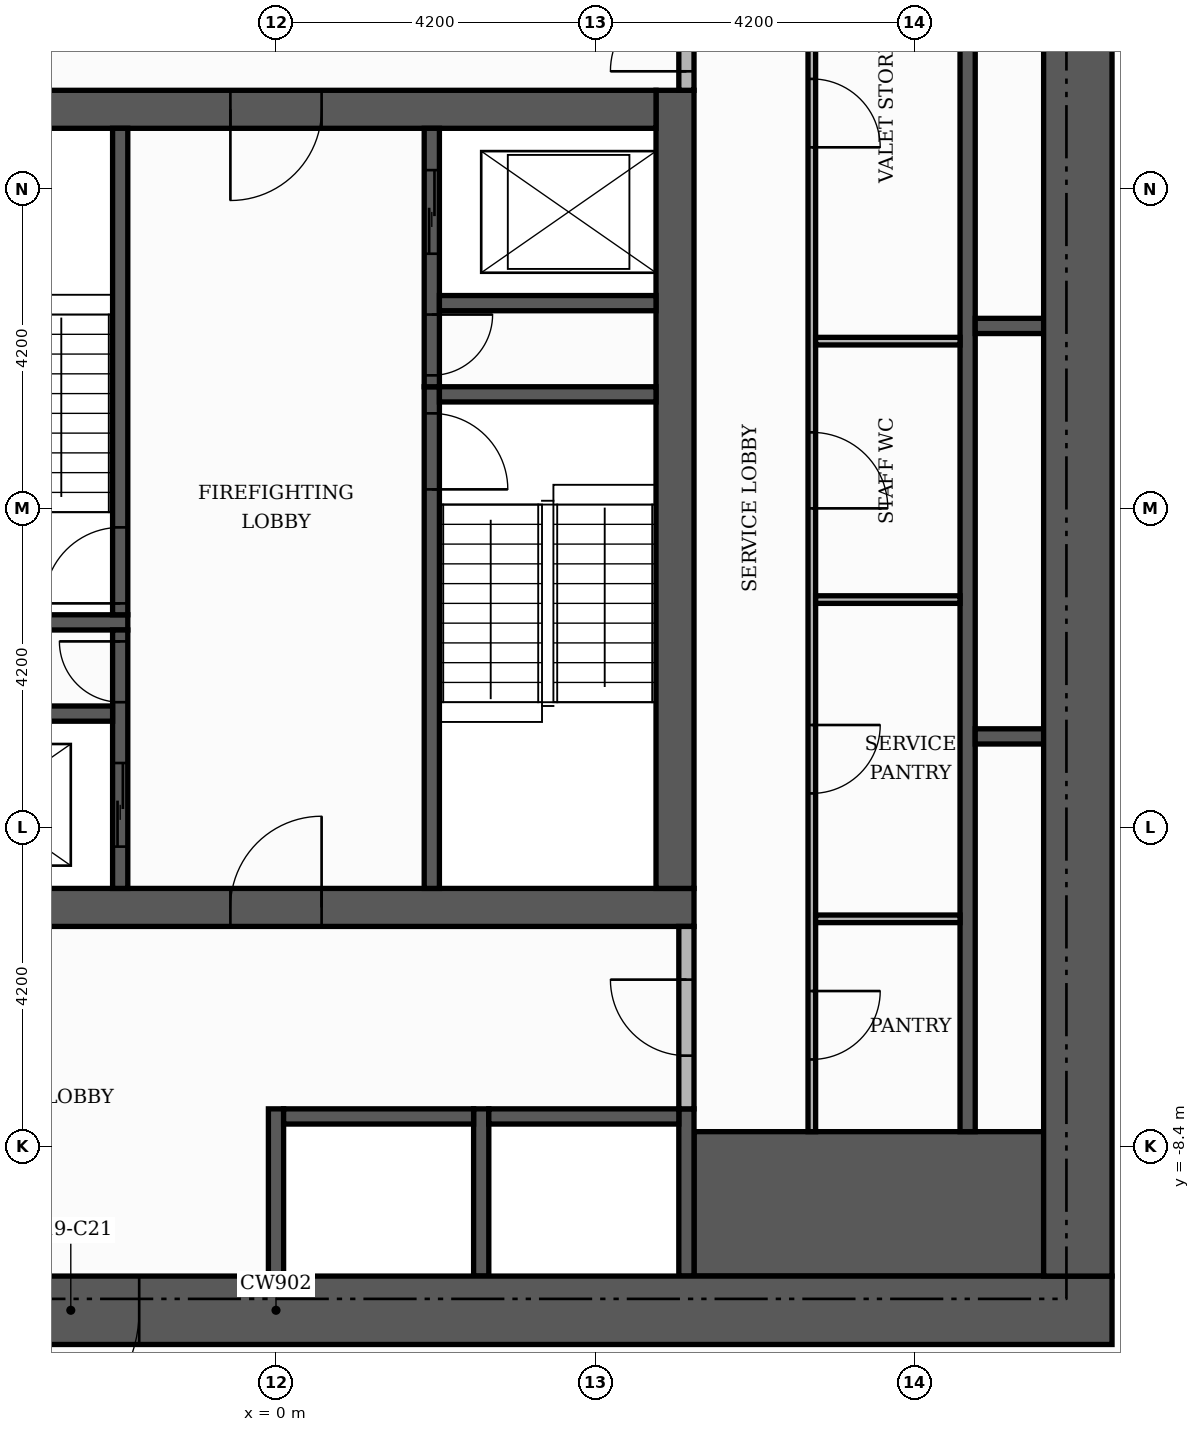
"""IFC4 building model, lengths in metres.
Left out: names, types, materials, properties, quantities, classifications, styles, units other than length and angle.
Written with IfcOpenShell. Run it as: python <this file> out.ifc"""

import sys

from ifc_helpers import new_model, si_unit, direction, frame, frame_2d, origin, place, context, subcontext, project, spatial, rectangle, extrude, element, fill, save


model = new_model("IFC4")
c1 = context("Model", 3, precision=1e-05, world=origin(), true_north=direction((0.0, 1.0)))
c2 = subcontext(c1, "Body", "Model", "MODEL_VIEW")
j1 = project(units=[si_unit("LENGTHUNIT", "METRE"), si_unit("PLANEANGLEUNIT", "RADIAN")], contexts=[c1])
p1 = place(None, origin())
s1 = spatial("IfcSite", under=j1, at=p1, CompositionType="ELEMENT")
p2 = place(p1, origin())
s2 = spatial("IfcBuilding", under=s1, at=p2, CompositionType="ELEMENT")
p3 = place(p2, frame((0.0, 0.0, 83.1)))
s3 = spatial("IfcBuildingStorey", under=s2, at=p3, CompositionType="ELEMENT", Elevation=83.1)
p4 = place(p3, frame((-5.5, -5.25, 0.0), z_axis=(0.0, 0.0, 1.0), x_axis=(1.0, 0.0, 0.0)))
e1 = element("IfcWall", 1, at=p4, inside=s3, PredefinedType="SHEAR", context=c2, shape_type="SweptSolid", body=[
    extrude(rectangle(XDim=11.0, YDim=0.5, at=frame_2d((5.5, 0.0))), origin(), (0.0, 0.0, 1.0), 3.48),
])
p5 = place(p4, frame((4.9, 0.0, 0.0)))
e2 = element("IfcOpeningElement", 2, at=p5, cuts=e1, PredefinedType="OPENING", context=c2, shape_type="SweptSolid", body=[
    extrude(rectangle(XDim=1.2, YDim=2.1, at=frame_2d((0.6, 1.05))), frame((0.0, 0.26, 0.0), z_axis=(0.0, -1.0, 0.0), x_axis=(1.0, 0.0, 0.0)), (0.0, 0.0, 1.0), 0.52),
])
p6 = place(p3, frame((5.25, -5.0, 0.0), z_axis=(0.0, 0.0, 1.0), x_axis=(0.0, 1.0, 0.0)))
e3 = element("IfcWall", 3, at=p6, inside=s3, PredefinedType="SHEAR", context=c2, shape_type="SweptSolid", body=[
    extrude(rectangle(XDim=10.5, YDim=0.5, at=frame_2d((5.25, 0.0))), origin(), (0.0, 0.0, 1.0), 3.48),
])
p7 = place(p3, frame((-5.0, 5.25, 0.0), z_axis=(0.0, 0.0, 1.0), x_axis=(1.0, 0.0, 0.0)))
e4 = element("IfcWall", 4, at=p7, inside=s3, PredefinedType="SHEAR", context=c2, shape_type="SweptSolid", body=[
    extrude(rectangle(XDim=10.0, YDim=0.5, at=frame_2d((5.0, 0.0))), origin(), (0.0, 0.0, 1.0), 3.48),
])
p8 = place(p7, frame((4.4, 0.0, 0.0)))
e5 = element("IfcOpeningElement", 5, at=p8, cuts=e4, PredefinedType="OPENING", context=c2, shape_type="SweptSolid", body=[
    extrude(rectangle(XDim=1.2, YDim=2.1, at=frame_2d((0.6, 1.05))), frame((0.0, 0.26, 0.0), z_axis=(0.0, -1.0, 0.0), x_axis=(1.0, 0.0, 0.0)), (0.0, 0.0, 1.0), 0.52),
])
p9 = place(p3, frame((5.5, -9.15, 0.0), z_axis=(0.0, 0.0, 1.0), x_axis=(1.0, 0.0, 0.0)))
e6 = element("IfcWall", 6, at=p9, inside=s3, PredefinedType="SHEAR", context=c2, shape_type="SweptSolid", body=[
    extrude(rectangle(XDim=4.6, YDim=1.9, at=frame_2d((2.3, 0.0))), origin(), (0.0, 0.0, 1.0), 3.48),
])
p10 = place(p3, frame((2.05, -5.0, 0.0), z_axis=(0.0, 0.0, 1.0), x_axis=(0.0, 1.0, 0.0)))
e7 = element("IfcWall", 7, at=p10, inside=s3, PredefinedType="SHEAR", context=c2, shape_type="SweptSolid", body=[
    extrude(rectangle(XDim=6.6, YDim=0.2, at=frame_2d((3.3, 0.0))), origin(), (0.0, 0.0, 1.0), 3.48),
])
p11 = place(p10, frame((5.25, 0.0, 0.0)))
e8 = element("IfcOpeningElement", 8, at=p11, cuts=e7, PredefinedType="OPENING", context=c2, shape_type="SweptSolid", body=[
    extrude(rectangle(XDim=1.0, YDim=2.1, at=frame_2d((0.5, 1.05))), frame((0.0, 0.11, 0.0), z_axis=(0.0, -1.0, 0.0), x_axis=(1.0, 0.0, 0.0)), (0.0, 0.0, 1.0), 0.22),
])
p12 = place(p3, frame((-5.0, -1.5, 0.0), z_axis=(0.0, 0.0, 1.0), x_axis=(1.0, 0.0, 0.0)))
e9 = element("IfcWall", 9, at=p12, inside=s3, PredefinedType="SHEAR", context=c2, shape_type="SweptSolid", body=[
    extrude(rectangle(XDim=3.05, YDim=0.2, at=frame_2d((1.525, 0.0))), origin(), (0.0, 0.0, 1.0), 3.48),
])
p13 = place(p3, frame((-2.05, -1.4, 0.0), z_axis=(0.0, 0.0, 1.0), x_axis=(0.0, 1.0, 0.0)))
e10 = element("IfcWall", 10, at=p13, inside=s3, PredefinedType="SHEAR", context=c2, shape_type="SweptSolid", body=[
    extrude(rectangle(XDim=6.4, YDim=0.2, at=frame_2d((3.2, 0.0))), origin(), (0.0, 0.0, 1.0), 3.48),
])
p14 = place(p13, frame((0.15, 0.0, 0.0)))
e11 = element("IfcOpeningElement", 11, at=p14, cuts=e10, PredefinedType="OPENING", context=c2, shape_type="SweptSolid", body=[
    extrude(rectangle(XDim=1.0, YDim=2.1, at=frame_2d((0.5, 1.05))), frame((0.0, 0.11, 0.0), z_axis=(0.0, -1.0, 0.0), x_axis=(1.0, 0.0, 0.0)), (0.0, 0.0, 1.0), 0.22),
])
p15 = place(p3, frame((2.15, 1.5, 0.0), z_axis=(0.0, 0.0, 1.0), x_axis=(1.0, 0.0, 0.0)))
e12 = element("IfcWall", 12, at=p15, inside=s3, PredefinedType="SHEAR", context=c2, shape_type="SweptSolid", body=[
    extrude(rectangle(XDim=2.85, YDim=0.2, at=frame_2d((1.425, 0.0))), origin(), (0.0, 0.0, 1.0), 3.48),
])
for number, where, z_axis, x_axis in (
    (13, (0.0, -10.1, 0.0), (0.0, 0.0, 1.0), (0.0, 1.0, 0.0)),
    (14, (2.7, -10.1, 0.0), (0.0, 0.0, 1.0), (0.0, 1.0, 0.0)),
    (15, (5.4, -10.1, 0.0), (0.0, 0.0, 1.0), (0.0, 1.0, 0.0)),
):
    element("IfcWall", number, at=place(p3, frame(where, z_axis=z_axis, x_axis=x_axis)), inside=s3, PredefinedType="SHEAR", context=c2, shape_type="SweptSolid", body=[
        extrude(rectangle(XDim=2.2, YDim=0.2, at=frame_2d((1.1, 0.0))), origin(), (0.0, 0.0, 1.0), 3.48),
    ])
p16 = place(p3, frame((9.1, -8.2, 0.0), z_axis=(0.0, 0.0, 1.0), x_axis=(0.0, 1.0, 0.0)))
e16 = element("IfcWall", 16, at=p16, inside=s3, PredefinedType="SHEAR", context=c2, shape_type="SweptSolid", body=[
    extrude(rectangle(XDim=16.4, YDim=0.2, at=frame_2d((8.2, 0.0))), origin(), (0.0, 0.0, 1.0), 3.48),
])
for number, where, z_axis, x_axis in (
    (17, (0.1, -8.0, 0.0), (0.0, 0.0, 1.0), (1.0, 0.0, 0.0)),
    (18, (2.8, -8.0, 0.0), (0.0, 0.0, 1.0), (1.0, 0.0, 0.0)),
):
    element("IfcWall", number, at=place(p3, frame(where, z_axis=z_axis, x_axis=x_axis)), inside=s3, PredefinedType="SHEAR", context=c2, shape_type="SweptSolid", body=[
        extrude(rectangle(XDim=2.5, YDim=0.2, at=frame_2d((1.25, 0.0))), origin(), (0.0, 0.0, 1.0), 3.48),
    ])
p17 = place(p3, frame((-2.05, -5.0, 0.0), z_axis=(0.0, 0.0, 1.0), x_axis=(0.0, 1.0, 0.0)))
e19 = element("IfcWall", 19, at=p17, inside=s3, PredefinedType="SHEAR", context=c2, shape_type="SweptSolid", body=[
    extrude(rectangle(XDim=3.4, YDim=0.2, at=frame_2d((1.7, 0.0))), origin(), (0.0, 0.0, 1.0), 3.48),
])
p18 = place(p17, frame((0.55, 0.0, 0.0)))
e20 = element("IfcOpeningElement", 20, at=p18, cuts=e19, PredefinedType="OPENING", context=c2, shape_type="SweptSolid", body=[
    extrude(rectangle(XDim=1.1, YDim=2.1, at=frame_2d((0.55, 1.05))), frame((0.0, 0.11, 0.0), z_axis=(0.0, -1.0, 0.0), x_axis=(1.0, 0.0, 0.0)), (0.0, 0.0, 1.0), 0.22),
])
p19 = place(p17, frame((2.45, 0.0, 0.0)))
e21 = element("IfcOpeningElement", 21, at=p19, cuts=e19, PredefinedType="OPENING", context=c2, shape_type="SweptSolid", body=[
    extrude(rectangle(XDim=0.8, YDim=2.1, at=frame_2d((0.4, 1.05))), frame((0.0, 0.11, 0.0), z_axis=(0.0, -1.0, 0.0), x_axis=(1.0, 0.0, 0.0)), (0.0, 0.0, 1.0), 0.22),
])
p20 = place(p3, frame((9.2, -3.0, 0.0), z_axis=(0.0, 0.0, 1.0), x_axis=(1.0, 0.0, 0.0)))
e22 = element("IfcWall", 22, at=p20, inside=s3, PredefinedType="SHEAR", context=c2, shape_type="SweptSolid", body=[
    extrude(rectangle(XDim=0.9, YDim=0.2, at=frame_2d((0.45, 0.0))), origin(), (0.0, 0.0, 1.0), 3.48),
])
p21 = place(p3, frame((-5.0, -2.7, 0.0), z_axis=(0.0, 0.0, 1.0), x_axis=(1.0, 0.0, 0.0)))
e23 = element("IfcWall", 23, at=p21, inside=s3, PredefinedType="SHEAR", context=c2, shape_type="SweptSolid", body=[
    extrude(rectangle(XDim=2.85, YDim=0.2, at=frame_2d((1.425, 0.0))), origin(), (0.0, 0.0, 1.0), 3.48),
])
p22 = place(p3, frame((2.05, 1.6, 0.0), z_axis=(0.0, 0.0, 1.0), x_axis=(0.0, 1.0, 0.0)))
e24 = element("IfcWall", 24, at=p22, inside=s3, PredefinedType="SHEAR", context=c2, shape_type="SweptSolid", body=[
    extrude(rectangle(XDim=3.4, YDim=0.2, at=frame_2d((1.7, 0.0))), origin(), (0.0, 0.0, 1.0), 3.48),
])
p23 = place(p22, frame((1.75, 0.0, 0.0)))
e25 = element("IfcOpeningElement", 25, at=p23, cuts=e24, PredefinedType="OPENING", context=c2, shape_type="SweptSolid", body=[
    extrude(rectangle(XDim=1.1, YDim=2.1, at=frame_2d((0.55, 1.05))), frame((0.0, 0.11, 0.0), z_axis=(0.0, -1.0, 0.0), x_axis=(1.0, 0.0, 0.0)), (0.0, 0.0, 1.0), 0.22),
])
p24 = place(p22, frame((0.15, 0.0, 0.0)))
e26 = element("IfcOpeningElement", 26, at=p24, cuts=e24, PredefinedType="OPENING", context=c2, shape_type="SweptSolid", body=[
    extrude(rectangle(XDim=0.8, YDim=2.1, at=frame_2d((0.4, 1.05))), frame((0.0, 0.11, 0.0), z_axis=(0.0, -1.0, 0.0), x_axis=(1.0, 0.0, 0.0)), (0.0, 0.0, 1.0), 0.22),
])
p25 = place(p3, frame((9.2, 2.4, 0.0), z_axis=(0.0, 0.0, 1.0), x_axis=(1.0, 0.0, 0.0)))
e27 = element("IfcWall", 27, at=p25, inside=s3, PredefinedType="SHEAR", context=c2, shape_type="SweptSolid", body=[
    extrude(rectangle(XDim=0.9, YDim=0.2, at=frame_2d((0.45, 0.0))), origin(), (0.0, 0.0, 1.0), 3.48),
])
p26 = place(p3, frame((2.15, 2.7, 0.0), z_axis=(0.0, 0.0, 1.0), x_axis=(1.0, 0.0, 0.0)))
e28 = element("IfcWall", 28, at=p26, inside=s3, PredefinedType="SHEAR", context=c2, shape_type="SweptSolid", body=[
    extrude(rectangle(XDim=2.85, YDim=0.2, at=frame_2d((1.425, 0.0))), origin(), (0.0, 0.0, 1.0), 3.48),
])
p27 = place(p3, frame((-11.0, -10.55, 0.0), z_axis=(0.0, 0.0, 1.0), x_axis=(1.0, 0.0, 0.0)))
e29 = element("IfcWall", 29, at=p27, inside=s3, PredefinedType="SHEAR", context=c2, shape_type="SweptSolid", body=[
    extrude(rectangle(XDim=22.0, YDim=0.9, at=frame_2d((11.0, 0.0))), origin(), (0.0, 0.0, 1.0), 3.48),
])
p28 = place(p27, frame((7.4, 0.0, 0.0)))
e30 = element("IfcOpeningElement", 30, at=p28, cuts=e29, PredefinedType="OPENING", context=c2, shape_type="SweptSolid", body=[
    extrude(rectangle(XDim=1.8, YDim=2.2, at=frame_2d((0.9, 1.1))), frame((0.0, 0.46, 0.0), z_axis=(0.0, -1.0, 0.0), x_axis=(1.0, 0.0, 0.0)), (0.0, 0.0, 1.0), 0.92),
])
p29 = place(p3, frame((10.55, -10.1, 0.0), z_axis=(0.0, 0.0, 1.0), x_axis=(0.0, 1.0, 0.0)))
e31 = element("IfcWall", 31, at=p29, inside=s3, PredefinedType="SHEAR", context=c2, shape_type="SweptSolid", body=[
    extrude(rectangle(XDim=20.2, YDim=0.9, at=frame_2d((10.1, 0.0))), origin(), (0.0, 0.0, 1.0), 3.48),
])
p30 = place(p3, frame((7.05, -8.2, 0.0), z_axis=(0.0, 0.0, 1.0), x_axis=(0.0, 1.0, 0.0)))
e32 = element("IfcWall", 32, at=p30, inside=s3, PredefinedType="PARTITIONING", context=c2, shape_type="SweptSolid", body=[
    extrude(rectangle(XDim=16.4, YDim=0.1, at=frame_2d((8.2, 0.0))), origin(), (0.0, 0.0, 1.0), 3.48),
])
p31 = place(p30, frame((0.95, 0.0, 0.0)))
e33 = element("IfcOpeningElement", 33, at=p31, cuts=e32, PredefinedType="OPENING", context=c2, shape_type="SweptSolid", body=[
    extrude(rectangle(XDim=0.9, YDim=2.1, at=frame_2d((0.45, 1.05))), frame((0.0, 0.06, 0.0), z_axis=(0.0, -1.0, 0.0), x_axis=(1.0, 0.0, 0.0)), (0.0, 0.0, 1.0), 0.12),
])
p32 = place(p30, frame((4.45, 0.0, 0.0)))
e34 = element("IfcOpeningElement", 34, at=p32, cuts=e32, PredefinedType="OPENING", context=c2, shape_type="SweptSolid", body=[
    extrude(rectangle(XDim=0.9, YDim=2.1, at=frame_2d((0.45, 1.05))), frame((0.0, 0.06, 0.0), z_axis=(0.0, -1.0, 0.0), x_axis=(1.0, 0.0, 0.0)), (0.0, 0.0, 1.0), 0.12),
])
p33 = place(p30, frame((8.2, 0.0, 0.0)))
e35 = element("IfcOpeningElement", 35, at=p33, cuts=e32, PredefinedType="OPENING", context=c2, shape_type="SweptSolid", body=[
    extrude(rectangle(XDim=1.0, YDim=2.1, at=frame_2d((0.5, 1.05))), frame((0.0, 0.06, 0.0), z_axis=(0.0, -1.0, 0.0), x_axis=(1.0, 0.0, 0.0)), (0.0, 0.0, 1.0), 0.12),
])
p34 = place(p30, frame((12.95, 0.0, 0.0)))
e36 = element("IfcOpeningElement", 36, at=p34, cuts=e32, PredefinedType="OPENING", context=c2, shape_type="SweptSolid", body=[
    extrude(rectangle(XDim=0.9, YDim=2.1, at=frame_2d((0.45, 1.05))), frame((0.0, 0.06, 0.0), z_axis=(0.0, -1.0, 0.0), x_axis=(1.0, 0.0, 0.0)), (0.0, 0.0, 1.0), 0.12),
])
p35 = place(p3, frame((5.4, -7.9, 0.0), z_axis=(0.0, 0.0, 1.0), x_axis=(0.0, 1.0, 0.0)))
e37 = element("IfcWall", 37, at=p35, inside=s3, PredefinedType="PARTITIONING", context=c2, shape_type="SweptSolid", body=[
    extrude(rectangle(XDim=2.4, YDim=0.2, at=frame_2d((1.2, 0.0))), origin(), (0.0, 0.0, 1.0), 3.48),
])
p36 = place(p35, frame((0.7, 0.0, 0.0)))
e38 = element("IfcOpeningElement", 38, at=p36, cuts=e37, PredefinedType="OPENING", context=c2, shape_type="SweptSolid", body=[
    extrude(rectangle(XDim=1.0, YDim=2.1, at=frame_2d((0.5, 1.05))), frame((0.0, 0.11, 0.0), z_axis=(0.0, -1.0, 0.0), x_axis=(1.0, 0.0, 0.0)), (0.0, 0.0, 1.0), 0.22),
])
for number, where, z_axis, x_axis in (
    (39, (7.1, -5.4, 0.0), (0.0, 0.0, 1.0), (1.0, 0.0, 0.0)),
    (40, (7.1, -1.2, 0.0), (0.0, 0.0, 1.0), (1.0, 0.0, 0.0)),
    (41, (7.1, 2.2, 0.0), (0.0, 0.0, 1.0), (1.0, 0.0, 0.0)),
):
    element("IfcWall", number, at=place(p3, frame(where, z_axis=z_axis, x_axis=x_axis)), inside=s3, PredefinedType="PARTITIONING", context=c2, shape_type="SweptSolid", body=[
        extrude(rectangle(XDim=1.9, YDim=0.1, at=frame_2d((0.95, 0.0))), origin(), (0.0, 0.0, 1.0), 3.48),
    ])
p37 = place(p3, frame((5.4, 5.5, 0.0), z_axis=(0.0, 0.0, 1.0), x_axis=(0.0, 1.0, 0.0)))
e42 = element("IfcWall", 42, at=p37, inside=s3, PredefinedType="PARTITIONING", context=c2, shape_type="SweptSolid", body=[
    extrude(rectangle(XDim=4.6, YDim=0.2, at=frame_2d((2.3, 0.0))), origin(), (0.0, 0.0, 1.0), 3.48),
])
p38 = place(p37, frame((0.25, 0.0, 0.0)))
e43 = element("IfcOpeningElement", 43, at=p38, cuts=e42, PredefinedType="OPENING", context=c2, shape_type="SweptSolid", body=[
    extrude(rectangle(XDim=1.0, YDim=2.1, at=frame_2d((0.5, 1.05))), frame((0.0, 0.11, 0.0), z_axis=(0.0, -1.0, 0.0), x_axis=(1.0, 0.0, 0.0)), (0.0, 0.0, 1.0), 0.22),
])
p39 = place(p23, origin())
e44 = element("IfcDoor", 44, at=p39, inside=s3, OperationType="SLIDING_TO_LEFT", PredefinedType="DOOR", context=c2, shape_type="SweptSolid", body=[
    extrude(rectangle(XDim=1.1, YDim=2.1, at=frame_2d((0.55, 1.05))), frame((0.0, 0.025, 0.0), z_axis=(0.0, -1.0, 0.0), x_axis=(1.0, 0.0, 0.0)), (0.0, 0.0, 1.0), 0.05),
])
fill(e25, e44)
p40 = place(p18, origin())
e45 = element("IfcDoor", 45, at=p40, inside=s3, OperationType="SLIDING_TO_LEFT", PredefinedType="DOOR", context=c2, shape_type="SweptSolid", body=[
    extrude(rectangle(XDim=1.1, YDim=2.1, at=frame_2d((0.55, 1.05))), frame((0.0, 0.025, 0.0), z_axis=(0.0, -1.0, 0.0), x_axis=(1.0, 0.0, 0.0)), (0.0, 0.0, 1.0), 0.05),
])
fill(e20, e45)
p41 = place(p14, origin())
e46 = element("IfcDoor", 46, at=p41, inside=s3, OperationType="SINGLE_SWING_LEFT", PredefinedType="DOOR", context=c2, shape_type="SweptSolid", body=[
    extrude(rectangle(XDim=1.0, YDim=2.1, at=frame_2d((0.5, 1.05))), frame((0.0, 0.025, 0.0), z_axis=(0.0, -1.0, 0.0), x_axis=(1.0, 0.0, 0.0)), (0.0, 0.0, 1.0), 0.05),
])
fill(e11, e46)
p42 = place(p11, frame((1.0, 0.0, 0.0), z_axis=(0.0, 0.0, 1.0), x_axis=(-1.0, 0.0, 0.0)))
e47 = element("IfcDoor", 47, at=p42, inside=s3, OperationType="SINGLE_SWING_LEFT", PredefinedType="DOOR", context=c2, shape_type="SweptSolid", body=[
    extrude(rectangle(XDim=1.0, YDim=2.1, at=frame_2d((0.5, 1.05))), frame((0.0, 0.025, 0.0), z_axis=(0.0, -1.0, 0.0), x_axis=(1.0, 0.0, 0.0)), (0.0, 0.0, 1.0), 0.05),
])
fill(e8, e47)
p43 = place(p24, frame((0.8, 0.0, 0.0), z_axis=(0.0, 0.0, 1.0), x_axis=(-1.0, 0.0, 0.0)))
e48 = element("IfcDoor", 48, at=p43, inside=s3, OperationType="SINGLE_SWING_RIGHT", PredefinedType="DOOR", context=c2, shape_type="SweptSolid", body=[
    extrude(rectangle(XDim=0.8, YDim=2.1, at=frame_2d((0.4, 1.05))), frame((0.0, 0.025, 0.0), z_axis=(0.0, -1.0, 0.0), x_axis=(1.0, 0.0, 0.0)), (0.0, 0.0, 1.0), 0.05),
])
fill(e26, e48)
p44 = place(p19, origin())
e49 = element("IfcDoor", 49, at=p44, inside=s3, OperationType="SINGLE_SWING_RIGHT", PredefinedType="DOOR", context=c2, shape_type="SweptSolid", body=[
    extrude(rectangle(XDim=0.8, YDim=2.1, at=frame_2d((0.4, 1.05))), frame((0.0, 0.025, 0.0), z_axis=(0.0, -1.0, 0.0), x_axis=(1.0, 0.0, 0.0)), (0.0, 0.0, 1.0), 0.05),
])
fill(e21, e49)
p45 = place(p8, frame((1.2, 0.0, 0.0), z_axis=(0.0, 0.0, 1.0), x_axis=(-1.0, 0.0, 0.0)))
e50 = element("IfcDoor", 50, at=p45, inside=s3, OperationType="SINGLE_SWING_LEFT", PredefinedType="DOOR", context=c2, shape_type="SweptSolid", body=[
    extrude(rectangle(XDim=1.2, YDim=2.1, at=frame_2d((0.6, 1.05))), frame((0.0, 0.025, 0.0), z_axis=(0.0, -1.0, 0.0), x_axis=(1.0, 0.0, 0.0)), (0.0, 0.0, 1.0), 0.05),
])
fill(e5, e50)
p46 = place(p5, origin())
e51 = element("IfcDoor", 51, at=p46, inside=s3, OperationType="SINGLE_SWING_RIGHT", PredefinedType="DOOR", context=c2, shape_type="SweptSolid", body=[
    extrude(rectangle(XDim=1.2, YDim=2.1, at=frame_2d((0.6, 1.05))), frame((0.0, 0.025, 0.0), z_axis=(0.0, -1.0, 0.0), x_axis=(1.0, 0.0, 0.0)), (0.0, 0.0, 1.0), 0.05),
])
fill(e2, e51)
p47 = place(p38, origin())
e52 = element("IfcDoor", 52, at=p47, inside=s3, OperationType="SINGLE_SWING_LEFT", PredefinedType="DOOR", context=c2, shape_type="SweptSolid", body=[
    extrude(rectangle(XDim=1.0, YDim=2.1, at=frame_2d((0.5, 1.05))), frame((0.0, 0.025, 0.0), z_axis=(0.0, -1.0, 0.0), x_axis=(1.0, 0.0, 0.0)), (0.0, 0.0, 1.0), 0.05),
])
fill(e43, e52)
p48 = place(p36, origin())
e53 = element("IfcDoor", 53, at=p48, inside=s3, OperationType="SINGLE_SWING_RIGHT", PredefinedType="DOOR", context=c2, shape_type="SweptSolid", body=[
    extrude(rectangle(XDim=1.0, YDim=2.1, at=frame_2d((0.5, 1.05))), frame((0.0, 0.025, 0.0), z_axis=(0.0, -1.0, 0.0), x_axis=(1.0, 0.0, 0.0)), (0.0, 0.0, 1.0), 0.05),
])
fill(e38, e53)
p49 = place(p28, frame((1.8, 0.0, 0.0), z_axis=(0.0, 0.0, 1.0), x_axis=(-1.0, 0.0, 0.0)))
e54 = element("IfcDoor", 54, at=p49, inside=s3, OperationType="DOUBLE_DOOR_SINGLE_SWING", PredefinedType="DOOR", context=c2, shape_type="SweptSolid", body=[
    extrude(rectangle(XDim=1.8, YDim=2.2, at=frame_2d((0.9, 1.1))), frame((0.0, 0.025, 0.0), z_axis=(0.0, -1.0, 0.0), x_axis=(1.0, 0.0, 0.0)), (0.0, 0.0, 1.0), 0.05),
])
fill(e30, e54)
p50 = place(p31, frame((0.9, 0.0, 0.0), z_axis=(0.0, 0.0, 1.0), x_axis=(-1.0, 0.0, 0.0)))
e55 = element("IfcDoor", 55, at=p50, inside=s3, OperationType="SINGLE_SWING_RIGHT", PredefinedType="DOOR", context=c2, shape_type="SweptSolid", body=[
    extrude(rectangle(XDim=0.9, YDim=2.1, at=frame_2d((0.45, 1.05))), frame((0.0, 0.025, 0.0), z_axis=(0.0, -1.0, 0.0), x_axis=(1.0, 0.0, 0.0)), (0.0, 0.0, 1.0), 0.05),
])
fill(e33, e55)
p51 = place(p32, frame((0.9, 0.0, 0.0), z_axis=(0.0, 0.0, 1.0), x_axis=(-1.0, 0.0, 0.0)))
e56 = element("IfcDoor", 56, at=p51, inside=s3, OperationType="SINGLE_SWING_RIGHT", PredefinedType="DOOR", context=c2, shape_type="SweptSolid", body=[
    extrude(rectangle(XDim=0.9, YDim=2.1, at=frame_2d((0.45, 1.05))), frame((0.0, 0.025, 0.0), z_axis=(0.0, -1.0, 0.0), x_axis=(1.0, 0.0, 0.0)), (0.0, 0.0, 1.0), 0.05),
])
fill(e34, e56)
p52 = place(p33, frame((1.0, 0.0, 0.0), z_axis=(0.0, 0.0, 1.0), x_axis=(-1.0, 0.0, 0.0)))
e57 = element("IfcDoor", 57, at=p52, inside=s3, OperationType="SINGLE_SWING_LEFT", PredefinedType="DOOR", context=c2, shape_type="SweptSolid", body=[
    extrude(rectangle(XDim=1.0, YDim=2.1, at=frame_2d((0.5, 1.05))), frame((0.0, 0.025, 0.0), z_axis=(0.0, -1.0, 0.0), x_axis=(1.0, 0.0, 0.0)), (0.0, 0.0, 1.0), 0.05),
])
fill(e35, e57)
p53 = place(p34, frame((0.9, 0.0, 0.0), z_axis=(0.0, 0.0, 1.0), x_axis=(-1.0, 0.0, 0.0)))
e58 = element("IfcDoor", 58, at=p53, inside=s3, OperationType="SINGLE_SWING_LEFT", PredefinedType="DOOR", context=c2, shape_type="SweptSolid", body=[
    extrude(rectangle(XDim=0.9, YDim=2.1, at=frame_2d((0.45, 1.05))), frame((0.0, 0.025, 0.0), z_axis=(0.0, -1.0, 0.0), x_axis=(1.0, 0.0, 0.0)), (0.0, 0.0, 1.0), 0.05),
])
fill(e36, e58)
save(model, sys.argv[1])
